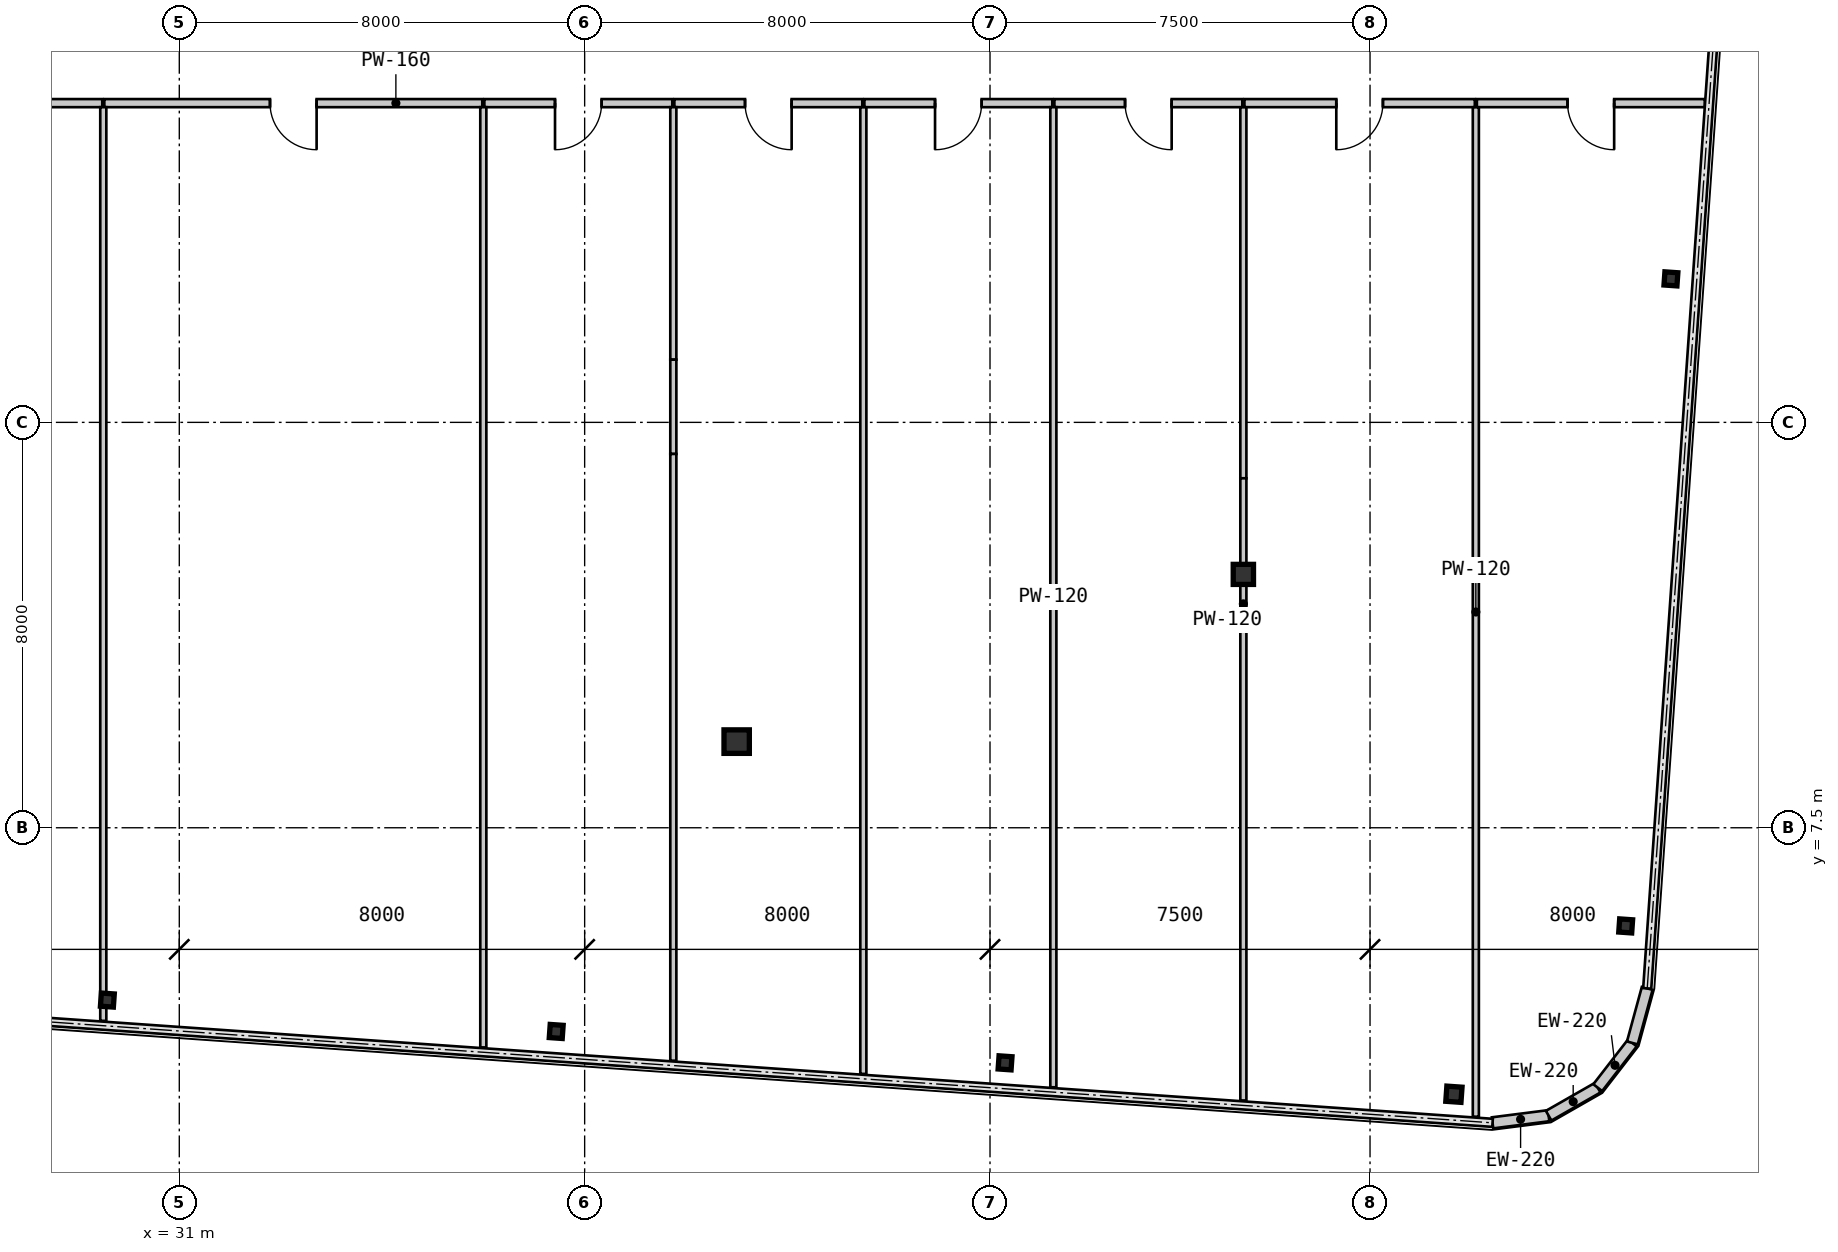
"""IFC4 building model, lengths in metres.
Left out: names, types, materials, properties, quantities, classifications, styles, units other than length and angle.
Written with IfcOpenShell. Run it as: python <this file> out.ifc"""

import sys

from ifc_helpers import new_model, si_unit, direction, frame, frame_2d, origin, origin_2d, place, context, subcontext, project, spatial, rectangle, hollow_rectangle, i_section, extrude, source, transform, mapped, element, fill, save


model = new_model("IFC4")
c1 = context("Model", 3, precision=1e-05, world=origin(), true_north=direction((0.0, 1.0)))
c2 = subcontext(c1, "Body", "Model", "MODEL_VIEW")
j1 = project(units=[si_unit("LENGTHUNIT", "METRE"), si_unit("PLANEANGLEUNIT", "RADIAN")], contexts=[c1])
p1 = place(None, origin())
s1 = spatial("IfcSite", under=j1, at=p1, CompositionType="ELEMENT")
p2 = place(p1, origin())
s2 = spatial("IfcBuilding", under=s1, at=p2, CompositionType="ELEMENT")
p3 = place(p2, frame((0.0, 0.0, 133.0)))
s3 = spatial("IfcBuildingStorey", under=s2, at=p3, CompositionType="ELEMENT", Elevation=133.0)
m1 = source(origin(), c2, "Body", "SweptSolid", [
    extrude(i_section(OverallWidth=0.5, OverallDepth=0.464, WebThickness=0.022, FlangeThickness=0.034, at=origin_2d()), origin(), (0.0, 0.0, 1.0), 3.15),
])
p4 = place(p3, frame((42.0, 9.2, 0.0), z_axis=(0.0, 0.0, 1.0), x_axis=(1.0, 0.0, 0.0)))
e1 = element("IfcColumn", 1, at=p4, inside=s3, PredefinedType="COLUMN", context=c2, shape_type="MappedRepresentation", body=[
    mapped(m1, transform((0.0, 0.0, 0.0), scale=1.0)),
])
m2 = source(origin(), c2, "Body", "SweptSolid", [
    extrude(i_section(OverallWidth=0.4, OverallDepth=0.396, WebThickness=0.022, FlangeThickness=0.034, at=origin_2d()), origin(), (0.0, 0.0, 1.0), 3.15),
])
p5 = place(p3, frame((52.0, 12.5, 0.0), z_axis=(0.0, 0.0, 1.0), x_axis=(1.0, 0.0, 0.0)))
e2 = element("IfcColumn", 2, at=p5, inside=s3, PredefinedType="COLUMN", context=c2, shape_type="MappedRepresentation", body=[
    mapped(m2, transform((0.0, 0.0, 0.0), scale=1.0)),
])
m3 = source(origin(), c2, "Body", "SweptSolid", [
    extrude(i_section(OverallWidth=0.256, OverallDepth=0.26, WebThickness=0.01, FlangeThickness=0.017, at=origin_2d()), origin(), (0.0, 0.0, 1.0), 3.15),
])
for number, where, z_axis, x_axis in (
    (3, (29.58, 4.1, 0.0), (0.0, 0.0, 1.0), (0.998, -0.07, 0.0)),
    (4, (38.439, 3.48, 0.0), (0.0, 0.0, 1.0), (0.998, -0.07, 0.0)),
    (5, (47.297, 2.861, 0.0), (0.0, 0.0, 1.0), (0.998, -0.07, 0.0)),
):
    element("IfcColumn", number, at=place(p3, frame(where, z_axis=z_axis, x_axis=x_axis)), inside=s3, PredefinedType="COLUMN", context=c2, shape_type="MappedRepresentation", body=[
        mapped(m3, transform((0.0, 0.0, 0.0), scale=1.0)),
    ])
m4 = source(origin(), c2, "Body", "SweptSolid", [
    extrude(hollow_rectangle(XDim=0.3, YDim=0.3, WallThickness=0.012, at=origin_2d()), origin(), (0.0, 0.0, 1.0), 3.15),
])
p6 = place(p3, frame((56.156, 2.241, 0.0), z_axis=(0.0, 0.0, 1.0), x_axis=(0.99756405026, -0.069756473744, 0.0)))
e6 = element("IfcColumn", 6, at=p6, inside=s3, PredefinedType="COLUMN", context=c2, shape_type="MappedRepresentation", body=[
    mapped(m4, transform((0.0, 0.0, 0.0), scale=1.0)),
])
for number, where, z_axis, x_axis in (
    (7, (59.545, 5.563, 0.0), (0.0, 0.0, 1.0), (0.998, -0.07, 0.0)),
    (8, (60.438, 18.332, 0.0), (0.0, 0.0, 1.0), (0.998, -0.07, 0.0)),
):
    element("IfcColumn", number, at=place(p3, frame(where, z_axis=z_axis, x_axis=x_axis)), inside=s3, PredefinedType="COLUMN", context=c2, shape_type="MappedRepresentation", body=[
        mapped(m3, transform((0.0, 0.0, 0.0), scale=1.0)),
    ])
m5 = source(origin(), c2, "Body", "SweptSolid", [
    extrude(rectangle(XDim=1.116, YDim=0.22, at=frame_2d((0.558, 0.0))), origin(), (0.0, 0.0, 1.0), 2.93),
])
p7 = place(p3, frame((56.918, 1.677, 0.0), z_axis=(0.0, 0.0, 1.0), x_axis=(0.99202678349, 0.126027222605, 0.0)))
e9 = element("IfcWall", 9, at=p7, inside=s3, PredefinedType="SOLIDWALL", context=c2, shape_type="MappedRepresentation", body=[
    mapped(m5, transform((0.0, 0.0, 0.0), scale=1.0)),
])
m6 = source(origin(), c2, "Body", "SweptSolid", [
    extrude(rectangle(XDim=1.116, YDim=0.22, at=frame_2d((0.558, 0.0))), origin(), (0.0, 0.0, 1.0), 2.93),
])
for number, where, z_axis, x_axis in (
    (10, (58.025, 1.817, 0.0), (0.0, 0.0, 1.0), (0.868, 0.496, 0.0)),
    (11, (58.994, 2.371, 0.0), (0.0, 0.0, 1.0), (0.612, 0.791, 0.0)),
    (12, (59.677, 3.254, 0.0), (0.0, 0.0, 1.0), (0.263, 0.965, 0.0)),
):
    element("IfcWall", number, at=place(p3, frame(where, z_axis=z_axis, x_axis=x_axis)), inside=s3, PredefinedType="SOLIDWALL", context=c2, shape_type="MappedRepresentation", body=[
        mapped(m6, transform((0.0, 0.0, 0.0), scale=1.0)),
    ])
m7 = source(origin(), c2, "Body", "SweptSolid", [
    extrude(rectangle(XDim=7.459, YDim=0.16, at=frame_2d((3.73, 0.0))), origin(), (0.0, 0.0, 1.0), 2.93),
])
p8 = place(p3, frame((29.48, 21.8, 0.0), z_axis=(0.0, 0.0, 1.0), x_axis=(-1.0, 0.0, 0.0)))
e13 = element("IfcWall", 13, at=p8, inside=s3, PredefinedType="PARTITIONING", context=c2, shape_type="MappedRepresentation", body=[
    mapped(m7, transform((0.0, 0.0, 0.0), scale=1.0)),
])
m8 = source(origin(), c2, "Body", "SweptSolid", [
    extrude(rectangle(XDim=0.92, YDim=2.1, at=frame_2d((0.46, 1.05))), frame((0.0, 0.09, 0.0), z_axis=(0.0, -1.0, 0.0), x_axis=(1.0, 0.0, 0.0)), (0.0, 0.0, 1.0), 0.18),
])
p9 = place(p8, frame((3.27, 0.0, 0.0)))
e14 = element("IfcOpeningElement", 14, at=p9, cuts=e13, PredefinedType="OPENING", context=c2, shape_type="MappedRepresentation", body=[
    mapped(m8, transform((0.0, 0.0, 0.0), scale=1.0)),
])
p10 = place(p3, frame((36.98, 21.8, 0.0), z_axis=(0.0, 0.0, 1.0), x_axis=(-1.0, 0.0, 0.0)))
e15 = element("IfcWall", 15, at=p10, inside=s3, PredefinedType="PARTITIONING", context=c2, shape_type="MappedRepresentation", body=[
    mapped(m7, transform((0.0, 0.0, 0.0), scale=1.0)),
])
p11 = place(p10, frame((3.27, 0.0, 0.0)))
e16 = element("IfcOpeningElement", 16, at=p11, cuts=e15, PredefinedType="OPENING", context=c2, shape_type="MappedRepresentation", body=[
    mapped(m8, transform((0.0, 0.0, 0.0), scale=1.0)),
])
m9 = source(origin(), c2, "Body", "SweptSolid", [
    extrude(rectangle(XDim=3.709, YDim=0.16, at=frame_2d((1.855, 0.0))), origin(), (0.0, 0.0, 1.0), 2.93),
])
p12 = place(p3, frame((40.73, 21.8, 0.0), z_axis=(0.0, 0.0, 1.0), x_axis=(-1.0, 0.0, 0.0)))
e17 = element("IfcWall", 17, at=p12, inside=s3, PredefinedType="PARTITIONING", context=c2, shape_type="MappedRepresentation", body=[
    mapped(m9, transform((0.0, 0.0, 0.0), scale=1.0)),
])
p13 = place(p12, frame((1.395, 0.0, 0.0)))
e18 = element("IfcOpeningElement", 18, at=p13, cuts=e17, PredefinedType="OPENING", context=c2, shape_type="MappedRepresentation", body=[
    mapped(m8, transform((0.0, 0.0, 0.0), scale=1.0)),
])
p14 = place(p3, frame((44.48, 21.8, 0.0), z_axis=(0.0, 0.0, 1.0), x_axis=(-1.0, 0.0, 0.0)))
e19 = element("IfcWall", 19, at=p14, inside=s3, PredefinedType="PARTITIONING", context=c2, shape_type="MappedRepresentation", body=[
    mapped(m9, transform((0.0, 0.0, 0.0), scale=1.0)),
])
p15 = place(p14, frame((1.395, 0.0, 0.0)))
e20 = element("IfcOpeningElement", 20, at=p15, cuts=e19, PredefinedType="OPENING", context=c2, shape_type="MappedRepresentation", body=[
    mapped(m8, transform((0.0, 0.0, 0.0), scale=1.0)),
])
p16 = place(p3, frame((48.23, 21.8, 0.0), z_axis=(0.0, 0.0, 1.0), x_axis=(-1.0, 0.0, 0.0)))
e21 = element("IfcWall", 21, at=p16, inside=s3, PredefinedType="PARTITIONING", context=c2, shape_type="MappedRepresentation", body=[
    mapped(m9, transform((0.0, 0.0, 0.0), scale=1.0)),
])
p17 = place(p16, frame((1.395, 0.0, 0.0)))
e22 = element("IfcOpeningElement", 22, at=p17, cuts=e21, PredefinedType="OPENING", context=c2, shape_type="MappedRepresentation", body=[
    mapped(m8, transform((0.0, 0.0, 0.0), scale=1.0)),
])
p18 = place(p3, frame((51.98, 21.8, 0.0), z_axis=(0.0, 0.0, 1.0), x_axis=(-1.0, 0.0, 0.0)))
e23 = element("IfcWall", 23, at=p18, inside=s3, PredefinedType="PARTITIONING", context=c2, shape_type="MappedRepresentation", body=[
    mapped(m9, transform((0.0, 0.0, 0.0), scale=1.0)),
])
p19 = place(p18, frame((1.395, 0.0, 0.0)))
e24 = element("IfcOpeningElement", 24, at=p19, cuts=e23, PredefinedType="OPENING", context=c2, shape_type="MappedRepresentation", body=[
    mapped(m8, transform((0.0, 0.0, 0.0), scale=1.0)),
])
m10 = source(origin(), c2, "Body", "SweptSolid", [
    extrude(rectangle(XDim=4.547, YDim=0.16, at=frame_2d((2.274, 0.0))), origin(), (0.0, 0.0, 1.0), 2.93),
])
p20 = place(p3, frame((56.568, 21.8, 0.0), z_axis=(0.0, 0.0, 1.0), x_axis=(-1.0, 0.0, 0.0)))
e25 = element("IfcWall", 25, at=p20, inside=s3, PredefinedType="PARTITIONING", context=c2, shape_type="MappedRepresentation", body=[
    mapped(m10, transform((0.0, 0.0, 0.0), scale=1.0)),
])
p21 = place(p20, frame((1.814, 0.0, 0.0)))
e26 = element("IfcOpeningElement", 26, at=p21, cuts=e25, PredefinedType="OPENING", context=c2, shape_type="MappedRepresentation", body=[
    mapped(m8, transform((0.0, 0.0, 0.0), scale=1.0)),
])
m11 = source(origin(), c2, "Body", "SweptSolid", [
    extrude(rectangle(XDim=4.499, YDim=0.16, at=frame_2d((2.25, 0.0))), origin(), (0.0, 0.0, 1.0), 2.93),
])
p22 = place(p3, frame((61.107, 21.8, 0.0), z_axis=(0.0, 0.0, 1.0), x_axis=(-1.0, 0.0, 0.0)))
e27 = element("IfcWall", 27, at=p22, inside=s3, PredefinedType="PARTITIONING", context=c2, shape_type="MappedRepresentation", body=[
    mapped(m11, transform((0.0, 0.0, 0.0), scale=1.0)),
])
p23 = place(p22, frame((1.79, 0.0, 0.0)))
e28 = element("IfcOpeningElement", 28, at=p23, cuts=e27, PredefinedType="OPENING", context=c2, shape_type="MappedRepresentation", body=[
    mapped(m8, transform((0.0, 0.0, 0.0), scale=1.0)),
])
m12 = source(origin(), c2, "Body", "SweptSolid", [
    extrude(rectangle(XDim=18.03, YDim=0.12, at=frame_2d((9.015, 0.0))), origin(), (0.0, 0.0, 1.0), 2.93),
])
p24 = place(p3, frame((29.5, 21.72, 0.0), z_axis=(0.0, 0.0, 1.0), x_axis=(0.0, -1.0, 0.0)))
e29 = element("IfcWall", 29, at=p24, inside=s3, PredefinedType="PARTITIONING", context=c2, shape_type="MappedRepresentation", body=[
    mapped(m12, transform((0.0, 0.0, 0.0), scale=1.0)),
])
m13 = source(origin(), c2, "Body", "SweptSolid", [
    extrude(rectangle(XDim=18.555, YDim=0.12, at=frame_2d((9.277, 0.0))), origin(), (0.0, 0.0, 1.0), 2.93),
])
p25 = place(p3, frame((37.0, 21.72, 0.0), z_axis=(0.0, 0.0, 1.0), x_axis=(0.0, -1.0, 0.0)))
e30 = element("IfcWall", 30, at=p25, inside=s3, PredefinedType="PARTITIONING", context=c2, shape_type="MappedRepresentation", body=[
    mapped(m13, transform((0.0, 0.0, 0.0), scale=1.0)),
])
m14 = source(origin(), c2, "Body", "SweptSolid", [
    extrude(rectangle(XDim=4.982, YDim=0.12, at=frame_2d((2.491, 0.0))), origin(), (0.0, 0.0, 1.0), 2.93),
])
p26 = place(p3, frame((40.75, 21.72, 0.0), z_axis=(0.0, 0.0, 1.0), x_axis=(0.0, -1.0, 0.0)))
e31 = element("IfcWall", 31, at=p26, inside=s3, PredefinedType="PARTITIONING", context=c2, shape_type="MappedRepresentation", body=[
    mapped(m14, transform((0.0, 0.0, 0.0), scale=1.0)),
])
m15 = source(origin(), c2, "Body", "SweptSolid", [
    extrude(rectangle(XDim=1.861, YDim=0.12, at=frame_2d((0.93, 0.0))), origin(), (0.0, 0.0, 1.0), 2.328),
])
p27 = place(p3, frame((40.75, 16.738, 0.0), z_axis=(0.0, 0.0, 1.0), x_axis=(0.0, -1.0, 0.0)))
e32 = element("IfcWall", 32, at=p27, inside=s3, PredefinedType="PARTITIONING", context=c2, shape_type="MappedRepresentation", body=[
    mapped(m15, transform((0.0, 0.0, 0.0), scale=1.0)),
])
m16 = source(origin(), c2, "Body", "SweptSolid", [
    extrude(rectangle(XDim=11.974, YDim=0.12, at=frame_2d((5.987, 0.0))), origin(), (0.0, 0.0, 1.0), 2.93),
])
p28 = place(p3, frame((40.75, 14.877, 0.0), z_axis=(0.0, 0.0, 1.0), x_axis=(0.0, -1.0, 0.0)))
e33 = element("IfcWall", 33, at=p28, inside=s3, PredefinedType="PARTITIONING", context=c2, shape_type="MappedRepresentation", body=[
    mapped(m16, transform((0.0, 0.0, 0.0), scale=1.0)),
])
m17 = source(origin(), c2, "Body", "SweptSolid", [
    extrude(rectangle(XDim=19.075, YDim=0.12, at=frame_2d((9.538, 0.0))), origin(), (0.0, 0.0, 1.0), 2.93),
])
p29 = place(p3, frame((44.5, 21.718, 0.0), z_axis=(0.0, 0.0, 1.0), x_axis=(0.0, -1.0, 0.0)))
e34 = element("IfcWall", 34, at=p29, inside=s3, PredefinedType="PARTITIONING", context=c2, shape_type="MappedRepresentation", body=[
    mapped(m17, transform((0.0, 0.0, 0.0), scale=1.0)),
])
m18 = source(origin(), c2, "Body", "SweptSolid", [
    extrude(rectangle(XDim=19.341, YDim=0.12, at=frame_2d((9.671, 0.0))), origin(), (0.0, 0.0, 1.0), 2.93),
])
p30 = place(p3, frame((48.25, 21.72, 0.0), z_axis=(0.0, 0.0, 1.0), x_axis=(0.0, -1.0, 0.0)))
e35 = element("IfcWall", 35, at=p30, inside=s3, PredefinedType="PARTITIONING", context=c2, shape_type="MappedRepresentation", body=[
    mapped(m18, transform((0.0, 0.0, 0.0), scale=1.0)),
])
m19 = source(origin(), c2, "Body", "SweptSolid", [
    extrude(rectangle(XDim=7.322, YDim=0.12, at=frame_2d((3.661, 0.0))), origin(), (0.0, 0.0, 1.0), 2.93),
])
p31 = place(p3, frame((52.0, 21.718, 0.0), z_axis=(0.0, 0.0, 1.0), x_axis=(0.0, -1.0, 0.0)))
e36 = element("IfcWall", 36, at=p31, inside=s3, PredefinedType="PARTITIONING", context=c2, shape_type="MappedRepresentation", body=[
    mapped(m19, transform((0.0, 0.0, 0.0), scale=1.0)),
])
m20 = source(origin(), c2, "Body", "SweptSolid", [
    extrude(rectangle(XDim=1.901, YDim=0.12, at=frame_2d((0.951, 0.0))), origin(), (0.0, 0.0, 1.0), 2.397),
])
p32 = place(p3, frame((52.0, 14.396, 0.0), z_axis=(0.0, 0.0, 1.0), x_axis=(0.0, -1.0, 0.0)))
e37 = element("IfcWall", 37, at=p32, inside=s3, PredefinedType="PARTITIONING", context=c2, shape_type="MappedRepresentation", body=[
    mapped(m20, transform((0.0, 0.0, 0.0), scale=1.0)),
])
m21 = source(origin(), c2, "Body", "SweptSolid", [
    extrude(rectangle(XDim=10.376, YDim=0.12, at=frame_2d((5.188, 0.0))), origin(), (0.0, 0.0, 1.0), 2.93),
])
p33 = place(p3, frame((52.0, 12.495, 0.0), z_axis=(0.0, 0.0, 1.0), x_axis=(0.0, -1.0, 0.0)))
e38 = element("IfcWall", 38, at=p33, inside=s3, PredefinedType="PARTITIONING", context=c2, shape_type="MappedRepresentation", body=[
    mapped(m21, transform((0.0, 0.0, 0.0), scale=1.0)),
])
m22 = source(origin(), c2, "Body", "SweptSolid", [
    extrude(rectangle(XDim=19.92, YDim=0.12, at=frame_2d((9.96, 0.0))), origin(), (0.0, 0.0, 1.0), 2.93),
])
p34 = place(p3, frame((56.588, 21.718, 0.0), z_axis=(0.0, 0.0, 1.0), x_axis=(0.0, -1.0, 0.0)))
e39 = element("IfcWall", 39, at=p34, inside=s3, PredefinedType="PARTITIONING", context=c2, shape_type="MappedRepresentation", body=[
    mapped(m22, transform((0.0, 0.0, 0.0), scale=1.0)),
])
m23 = source(origin(), c2, "Body", "SweptSolid", [
    extrude(rectangle(XDim=0.92, YDim=2.1, at=frame_2d((0.46, 1.05))), frame((0.0, 0.025, 0.0), z_axis=(0.0, -1.0, 0.0), x_axis=(1.0, 0.0, 0.0)), (0.0, 0.0, 1.0), 0.05),
])
p35 = place(p11, origin())
e40 = element("IfcDoor", 40, at=p35, inside=s3, OperationType="SINGLE_SWING_LEFT", PredefinedType="DOOR", context=c2, shape_type="MappedRepresentation", body=[
    mapped(m23, transform((0.0, 0.0, 0.0), scale=1.0)),
])
fill(e16, e40)
p36 = place(p13, origin())
e41 = element("IfcDoor", 41, at=p36, inside=s3, OperationType="SINGLE_SWING_RIGHT", PredefinedType="DOOR", context=c2, shape_type="MappedRepresentation", body=[
    mapped(m23, transform((0.0, 0.0, 0.0), scale=1.0)),
])
fill(e18, e41)
p37 = place(p15, origin())
e42 = element("IfcDoor", 42, at=p37, inside=s3, OperationType="SINGLE_SWING_LEFT", PredefinedType="DOOR", context=c2, shape_type="MappedRepresentation", body=[
    mapped(m23, transform((0.0, 0.0, 0.0), scale=1.0)),
])
fill(e20, e42)
p38 = place(p17, origin())
e43 = element("IfcDoor", 43, at=p38, inside=s3, OperationType="SINGLE_SWING_RIGHT", PredefinedType="DOOR", context=c2, shape_type="MappedRepresentation", body=[
    mapped(m23, transform((0.0, 0.0, 0.0), scale=1.0)),
])
fill(e22, e43)
p39 = place(p19, origin())
e44 = element("IfcDoor", 44, at=p39, inside=s3, OperationType="SINGLE_SWING_LEFT", PredefinedType="DOOR", context=c2, shape_type="MappedRepresentation", body=[
    mapped(m23, transform((0.0, 0.0, 0.0), scale=1.0)),
])
fill(e24, e44)
p40 = place(p21, origin())
e45 = element("IfcDoor", 45, at=p40, inside=s3, OperationType="SINGLE_SWING_RIGHT", PredefinedType="DOOR", context=c2, shape_type="MappedRepresentation", body=[
    mapped(m23, transform((0.0, 0.0, 0.0), scale=1.0)),
])
fill(e26, e45)
p41 = place(p23, origin())
e46 = element("IfcDoor", 46, at=p41, inside=s3, OperationType="SINGLE_SWING_LEFT", PredefinedType="DOOR", context=c2, shape_type="MappedRepresentation", body=[
    mapped(m23, transform((0.0, 0.0, 0.0), scale=1.0)),
])
fill(e28, e46)
save(model, sys.argv[1])
